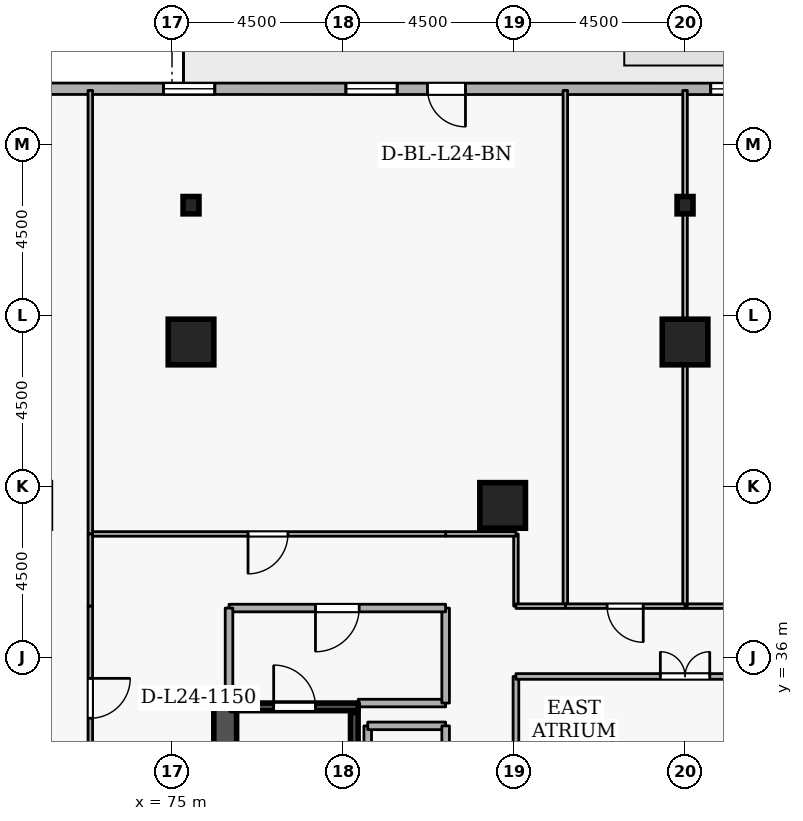
"""IFC4 building model, lengths in metres.
Left out: names, types, materials, properties, quantities, classifications, styles, units other than length and angle.
Written with IfcOpenShell. Run it as: python <this file> out.ifc"""

import sys

from ifc_helpers import new_model, si_unit, direction, frame, frame_2d, origin, origin_2d, place, context, subcontext, project, spatial, rectangle, i_section, extrude, element, fill, save


model = new_model("IFC4")
c1 = context("Model", 3, precision=1e-05, world=origin(), true_north=direction((0.0, 1.0)))
c2 = subcontext(c1, "Body", "Model", "MODEL_VIEW")
j1 = project(units=[si_unit("LENGTHUNIT", "METRE"), si_unit("PLANEANGLEUNIT", "RADIAN")], contexts=[c1])
p1 = place(None, origin())
s1 = spatial("IfcSite", under=j1, at=p1, CompositionType="ELEMENT")
p2 = place(p1, origin())
s2 = spatial("IfcBuilding", under=s1, at=p2, CompositionType="ELEMENT")
p3 = place(p2, frame((0.0, 0.0, 94.5)))
s3 = spatial("IfcBuildingStorey", under=s2, at=p3, CompositionType="ELEMENT", Elevation=94.5)
p4 = place(p3, frame((76.4, 19.2, 0.0), z_axis=(0.0, 0.0, 1.0), x_axis=(0.0, 1.0, 0.0)))
e1 = element("IfcWall", 1, at=p4, inside=s3, PredefinedType="SHEAR", context=c2, shape_type="SweptSolid", body=[
    extrude(rectangle(XDim=15.6, YDim=0.6, at=frame_2d((7.8, 0.0))), origin(), (0.0, 0.0, 1.0), 3.6),
])
for number, where, z_axis, x_axis in (
    (2, (88.5, 44.3, 0.0), (0.0, 0.0, 1.0), (1.0, 0.0, 0.0)),
    (3, (75.5, 44.3, 0.0), (0.0, 0.0, 1.0), (1.0, 0.0, 0.0)),
    (4, (83.7, 40.0, 0.0), (0.0, 0.0, 1.0), (1.0, 0.0, 0.0)),
):
    element("IfcColumn", number, at=place(p3, frame(where, z_axis=z_axis, x_axis=x_axis)), inside=s3, PredefinedType="COLUMN", context=c2, shape_type="SweptSolid", body=[
        extrude(rectangle(XDim=1.2, YDim=1.2, at=origin_2d()), origin(), (0.0, 0.0, 1.0), 3.6),
    ])
for number, where, z_axis, x_axis in (
    (5, (88.5, 47.9, 0.0), (0.0, 0.0, 1.0), (1.0, 0.0, 0.0)),
    (6, (75.5, 47.9, 0.0), (0.0, 0.0, 1.0), (1.0, 0.0, 0.0)),
):
    element("IfcColumn", number, at=place(p3, frame(where, z_axis=z_axis, x_axis=x_axis)), inside=s3, PredefinedType="COLUMN", context=c2, shape_type="SweptSolid", body=[
        extrude(i_section(OverallWidth=0.418, OverallDepth=0.456, WebThickness=0.042, FlangeThickness=0.067, FilletRadius=0.015, at=origin_2d()), origin(), (0.0, 0.0, 1.0), 3.6),
    ])
p5 = place(p3, frame((101.925, 50.958, 0.0), z_axis=(0.0, 0.0, 1.0), x_axis=(-0.999999983371, 0.000182370391, 0.0)))
e7 = element("IfcWall", 7, at=p5, inside=s3, PredefinedType="STANDARD", context=c2, shape_type="SweptSolid", body=[
    extrude(rectangle(XDim=34.806, YDim=0.3, at=frame_2d((17.403, 0.0))), origin(), (0.0, 0.0, 1.0), 2.22),
])
p6 = place(p5, frame((19.203, 0.0, 0.0)))
e8 = element("IfcOpeningElement", 8, at=p6, cuts=e7, PredefinedType="OPENING", context=c2, shape_type="SweptSolid", body=[
    extrude(rectangle(XDim=1.0, YDim=2.08, at=frame_2d((0.5, 1.04))), frame((0.0, 0.16, 0.0), z_axis=(0.0, -1.0, 0.0), x_axis=(1.0, 0.0, 0.0)), (0.0, 0.0, 1.0), 0.32),
])
p7 = place(p5, frame((1.8, 0.0, 0.72)))
e9 = element("IfcOpeningElement", 9, at=p7, cuts=e7, PredefinedType="OPENING", context=c2, shape_type="SweptSolid", body=[
    extrude(rectangle(XDim=1.35, YDim=1.05, at=frame_2d((0.675, 0.525))), frame((0.0, 0.16, 0.0), z_axis=(0.0, -1.0, 0.0), x_axis=(1.0, 0.0, 0.0)), (0.0, 0.0, 1.0), 0.32),
])
p8 = place(p5, frame((6.6, 0.0, 0.72)))
e10 = element("IfcOpeningElement", 10, at=p8, cuts=e7, PredefinedType="OPENING", context=c2, shape_type="SweptSolid", body=[
    extrude(rectangle(XDim=1.35, YDim=1.05, at=frame_2d((0.675, 0.525))), frame((0.0, 0.16, 0.0), z_axis=(0.0, -1.0, 0.0), x_axis=(1.0, 0.0, 0.0)), (0.0, 0.0, 1.0), 0.32),
])
p9 = place(p5, frame((11.4, 0.0, 0.72)))
e11 = element("IfcOpeningElement", 11, at=p9, cuts=e7, PredefinedType="OPENING", context=c2, shape_type="SweptSolid", body=[
    extrude(rectangle(XDim=1.35, YDim=1.05, at=frame_2d((0.675, 0.525))), frame((0.0, 0.16, 0.0), z_axis=(0.0, -1.0, 0.0), x_axis=(1.0, 0.0, 0.0)), (0.0, 0.0, 1.0), 0.32),
])
p10 = place(p5, frame((21.0, 0.0, 0.72)))
e12 = element("IfcOpeningElement", 12, at=p10, cuts=e7, PredefinedType="OPENING", context=c2, shape_type="SweptSolid", body=[
    extrude(rectangle(XDim=1.35, YDim=1.05, at=frame_2d((0.675, 0.525))), frame((0.0, 0.16, 0.0), z_axis=(0.0, -1.0, 0.0), x_axis=(1.0, 0.0, 0.0)), (0.0, 0.0, 1.0), 0.32),
])
p11 = place(p5, frame((25.8, 0.0, 0.72)))
e13 = element("IfcOpeningElement", 13, at=p11, cuts=e7, PredefinedType="OPENING", context=c2, shape_type="SweptSolid", body=[
    extrude(rectangle(XDim=1.35, YDim=1.05, at=frame_2d((0.675, 0.525))), frame((0.0, 0.16, 0.0), z_axis=(0.0, -1.0, 0.0), x_axis=(1.0, 0.0, 0.0)), (0.0, 0.0, 1.0), 0.32),
])
p12 = place(p5, frame((30.6, 0.0, 0.72)))
e14 = element("IfcOpeningElement", 14, at=p12, cuts=e7, PredefinedType="OPENING", context=c2, shape_type="SweptSolid", body=[
    extrude(rectangle(XDim=1.35, YDim=1.05, at=frame_2d((0.675, 0.525))), frame((0.0, 0.16, 0.0), z_axis=(0.0, -1.0, 0.0), x_axis=(1.0, 0.0, 0.0)), (0.0, 0.0, 1.0), 0.32),
])
p13 = place(p3, frame((76.55, 34.7, 0.0), z_axis=(0.0, 0.0, 1.0), x_axis=(1.0, 0.0, 0.0)))
e15 = element("IfcWall", 15, at=p13, inside=s3, PredefinedType="SHEAR", context=c2, shape_type="SweptSolid", body=[
    extrude(rectangle(XDim=3.35, YDim=0.2, at=frame_2d((1.675, 0.0))), origin(), (0.0, 0.0, 1.0), 3.6),
])
p14 = place(p13, frame((1.125, 0.0, 0.0)))
e16 = element("IfcOpeningElement", 16, at=p14, cuts=e15, PredefinedType="OPENING", context=c2, shape_type="SweptSolid", body=[
    extrude(rectangle(XDim=1.1, YDim=2.1, at=frame_2d((0.55, 1.05))), frame((0.0, 0.11, 0.0), z_axis=(0.0, -1.0, 0.0), x_axis=(1.0, 0.0, 0.0)), (0.0, 0.0, 1.0), 0.22),
])
p15 = place(p3, frame((79.797, 27.45, 0.0), z_axis=(0.0, 0.0, 1.0), x_axis=(0.0, 1.0, 0.0)))
e17 = element("IfcWall", 17, at=p15, inside=s3, PredefinedType="SHEAR", context=c2, shape_type="SweptSolid", body=[
    extrude(rectangle(XDim=7.1, YDim=0.2, at=frame_2d((3.55, 0.0))), origin(), (0.0, 0.0, 1.0), 3.6),
])
p16 = place(p3, frame((79.9, 34.8, 0.0), z_axis=(0.0, 0.0, 1.0), x_axis=(1.0, 0.0, 0.0)))
e18 = element("IfcWall", 18, at=p16, inside=s3, PredefinedType="STANDARD", context=c2, shape_type="SweptSolid", body=[
    extrude(rectangle(XDim=2.3, YDim=0.2, at=frame_2d((1.15, 0.0))), origin(), (0.0, 0.0, 1.0), 2.505),
])
p17 = place(p3, frame((82.2, 34.8, 0.0), z_axis=(0.0, 0.0, 1.0), x_axis=(0.0, 1.0, 0.0)))
e19 = element("IfcWall", 19, at=p17, inside=s3, PredefinedType="STANDARD", context=c2, shape_type="SweptSolid", body=[
    extrude(rectangle(XDim=2.5, YDim=0.2, at=frame_2d((1.25, 0.0))), origin(), (0.0, 0.0, 1.0), 3.3),
])
p18 = place(p3, frame((82.2, 37.3, 0.0), z_axis=(0.0, 0.0, 1.0), x_axis=(-1.0, 0.0, 0.0)))
e20 = element("IfcWall", 20, at=p18, inside=s3, PredefinedType="STANDARD", context=c2, shape_type="SweptSolid", body=[
    extrude(rectangle(XDim=5.7, YDim=0.2, at=frame_2d((2.85, 0.0))), origin(), (0.0, 0.0, 1.0), 3.3),
])
p19 = place(p18, frame((2.275, 0.0, 0.0)))
e21 = element("IfcOpeningElement", 21, at=p19, cuts=e20, PredefinedType="OPENING", context=c2, shape_type="SweptSolid", body=[
    extrude(rectangle(XDim=1.15, YDim=2.1, at=frame_2d((0.575, 1.05))), frame((0.0, 0.11, 0.0), z_axis=(0.0, -1.0, 0.0), x_axis=(1.0, 0.0, 0.0)), (0.0, 0.0, 1.0), 0.22),
])
p20 = place(p3, frame((76.5, 37.3, 0.0), z_axis=(0.0, 0.0, 1.0), x_axis=(0.0, -1.0, 0.0)))
e22 = element("IfcWall", 22, at=p20, inside=s3, PredefinedType="STANDARD", context=c2, shape_type="SweptSolid", body=[
    extrude(rectangle(XDim=2.5, YDim=0.2, at=frame_2d((1.25, 0.0))), origin(), (0.0, 0.0, 1.0), 3.3),
])
p21 = place(p3, frame((80.15, 31.85, 0.0), z_axis=(0.0, 0.0, 1.0), x_axis=(0.0, 1.0, 0.0)))
e23 = element("IfcWall", 23, at=p21, inside=s3, PredefinedType="STANDARD", context=c2, shape_type="SweptSolid", body=[
    extrude(rectangle(XDim=2.35, YDim=0.2, at=frame_2d((1.175, 0.0))), origin(), (0.0, 0.0, 1.0), 3.3),
])
p22 = place(p3, frame((80.15, 34.2, 0.0), z_axis=(0.0, 0.0, 1.0), x_axis=(1.0, 0.0, 0.0)))
e24 = element("IfcWall", 24, at=p22, inside=s3, PredefinedType="STANDARD", context=c2, shape_type="SweptSolid", body=[
    extrude(rectangle(XDim=2.05, YDim=0.2, at=frame_2d((1.025, 0.0))), origin(), (0.0, 0.0, 1.0), 2.505),
])
p23 = place(p3, frame((82.2, 34.2, 0.0), z_axis=(0.0, 0.0, 1.0), x_axis=(0.0, -1.0, 0.0)))
e25 = element("IfcWall", 25, at=p23, inside=s3, PredefinedType="STANDARD", context=c2, shape_type="SweptSolid", body=[
    extrude(rectangle(XDim=2.35, YDim=0.2, at=frame_2d((1.175, 0.0))), origin(), (0.0, 0.0, 1.0), 3.3),
])
p24 = place(p23, frame((0.6, 0.0, 0.0)))
e26 = element("IfcOpeningElement", 26, at=p24, cuts=e25, PredefinedType="OPENING", context=c2, shape_type="SweptSolid", body=[
    extrude(rectangle(XDim=1.15, YDim=2.1, at=frame_2d((0.575, 1.05))), frame((0.0, 0.11, 0.0), z_axis=(0.0, -1.0, 0.0), x_axis=(1.0, 0.0, 0.0)), (0.0, 0.0, 1.0), 0.22),
])
p25 = place(p3, frame((92.95, 37.35, 0.0), z_axis=(0.0, 0.0, 1.0), x_axis=(-1.0, 0.0, 0.0)))
e27 = element("IfcWall", 27, at=p25, inside=s3, PredefinedType="PARTITIONING", context=c2, shape_type="SweptSolid", body=[
    extrude(rectangle(XDim=4.45, YDim=0.12, at=frame_2d((2.225, 0.0))), origin(), (0.0, 0.0, 1.0), 3.3),
])
p26 = place(p25, frame((1.7, 0.0, 0.0)))
e28 = element("IfcOpeningElement", 28, at=p26, cuts=e27, PredefinedType="OPENING", context=c2, shape_type="SweptSolid", body=[
    extrude(rectangle(XDim=1.05, YDim=2.1, at=frame_2d((0.525, 1.05))), frame((0.0, 0.07, 0.0), z_axis=(0.0, -1.0, 0.0), x_axis=(1.0, 0.0, 0.0)), (0.0, 0.0, 1.0), 0.14),
])
p27 = place(p3, frame((88.5, 37.35, 0.0), z_axis=(0.0, 0.0, 1.0), x_axis=(0.0, 1.0, 0.0)))
e29 = element("IfcWall", 29, at=p27, inside=s3, PredefinedType="PARTITIONING", context=c2, shape_type="SweptSolid", body=[
    extrude(rectangle(XDim=13.57, YDim=0.12, at=frame_2d((6.785, 0.0))), origin(), (0.0, 0.0, 1.0), 2.892),
])
p28 = place(p3, frame((85.35, 37.35, 0.0), z_axis=(0.0, 0.0, 1.0), x_axis=(0.0, 1.0, 0.0)))
e30 = element("IfcWall", 30, at=p28, inside=s3, PredefinedType="PARTITIONING", context=c2, shape_type="SweptSolid", body=[
    extrude(rectangle(XDim=13.57, YDim=0.12, at=frame_2d((6.785, 0.0))), origin(), (0.0, 0.0, 1.0), 3.3),
])
p29 = place(p3, frame((88.5, 37.35, 0.0), z_axis=(0.0, 0.0, 1.0), x_axis=(-1.0, 0.0, 0.0)))
e31 = element("IfcWall", 31, at=p29, inside=s3, PredefinedType="PARTITIONING", context=c2, shape_type="SweptSolid", body=[
    extrude(rectangle(XDim=3.15, YDim=0.12, at=frame_2d((1.575, 0.0))), origin(), (0.0, 0.0, 1.0), 3.3),
])
p30 = place(p29, frame((1.1, 0.0, 0.0)))
e32 = element("IfcOpeningElement", 32, at=p30, cuts=e31, PredefinedType="OPENING", context=c2, shape_type="SweptSolid", body=[
    extrude(rectangle(XDim=0.95, YDim=2.1, at=frame_2d((0.475, 1.05))), frame((0.0, 0.07, 0.0), z_axis=(0.0, -1.0, 0.0), x_axis=(1.0, 0.0, 0.0)), (0.0, 0.0, 1.0), 0.14),
])
p31 = place(p3, frame((84.05, 37.35, 0.0), z_axis=(0.0, 0.0, 1.0), x_axis=(0.0, 1.0, 0.0)))
e33 = element("IfcWall", 33, at=p31, inside=s3, PredefinedType="PARTITIONING", context=c2, shape_type="SweptSolid", body=[
    extrude(rectangle(XDim=1.9, YDim=0.12, at=frame_2d((0.95, 0.0))), origin(), (0.0, 0.0, 1.0), 3.3),
])
p32 = place(p3, frame((84.05, 39.25, 0.0), z_axis=(0.0, 0.0, 1.0), x_axis=(-1.0, 0.0, 0.0)))
e34 = element("IfcWall", 34, at=p32, inside=s3, PredefinedType="PARTITIONING", context=c2, shape_type="SweptSolid", body=[
    extrude(rectangle(XDim=1.85, YDim=0.12, at=frame_2d((0.925, 0.0))), origin(), (0.0, 0.0, 1.0), 3.3),
])
p33 = place(p3, frame((82.2, 39.25, 0.0), z_axis=(0.0, 0.0, 1.0), x_axis=(-1.0, 0.0, 0.0)))
e35 = element("IfcWall", 35, at=p33, inside=s3, PredefinedType="PARTITIONING", context=c2, shape_type="SweptSolid", body=[
    extrude(rectangle(XDim=9.35, YDim=0.12, at=frame_2d((4.675, 0.0))), origin(), (0.0, 0.0, 1.0), 3.3),
])
p34 = place(p33, frame((4.15, 0.0, 0.0)))
e36 = element("IfcOpeningElement", 36, at=p34, cuts=e35, PredefinedType="OPENING", context=c2, shape_type="SweptSolid", body=[
    extrude(rectangle(XDim=1.05, YDim=2.1, at=frame_2d((0.525, 1.05))), frame((0.0, 0.07, 0.0), z_axis=(0.0, -1.0, 0.0), x_axis=(1.0, 0.0, 0.0)), (0.0, 0.0, 1.0), 0.14),
])
p35 = place(p3, frame((72.85, 39.25, 0.0), z_axis=(0.0, 0.0, 1.0), x_axis=(0.0, 1.0, 0.0)))
e37 = element("IfcWall", 37, at=p35, inside=s3, PredefinedType="PARTITIONING", context=c2, shape_type="SweptSolid", body=[
    extrude(rectangle(XDim=11.67, YDim=0.12, at=frame_2d((5.835, 0.0))), origin(), (0.0, 0.0, 1.0), 3.3),
])
p36 = place(p3, frame((85.35, 37.35, 0.0), z_axis=(0.0, 0.0, 1.0), x_axis=(-1.0, 0.0, 0.0)))
e38 = element("IfcWall", 38, at=p36, inside=s3, PredefinedType="PARTITIONING", context=c2, shape_type="SweptSolid", body=[
    extrude(rectangle(XDim=1.3, YDim=0.12, at=frame_2d((0.65, 0.0))), origin(), (0.0, 0.0, 1.0), 3.3),
])
p37 = place(p3, frame((84.05, 32.2, 0.0), z_axis=(0.0, 0.0, 1.0), x_axis=(0.0, 1.0, 0.0)))
e39 = element("IfcWall", 39, at=p37, inside=s3, PredefinedType="PARTITIONING", context=c2, shape_type="SweptSolid", body=[
    extrude(rectangle(XDim=3.3, YDim=0.15, at=frame_2d((1.65, 0.0))), origin(), (0.0, 0.0, 1.0), 3.3),
])
p38 = place(p3, frame((84.05, 35.5, 0.0), z_axis=(0.0, 0.0, 1.0), x_axis=(1.0, 0.0, 0.0)))
e40 = element("IfcWall", 40, at=p38, inside=s3, PredefinedType="PARTITIONING", context=c2, shape_type="SweptSolid", body=[
    extrude(rectangle(XDim=8.9, YDim=0.15, at=frame_2d((4.45, 0.0))), origin(), (0.0, 0.0, 1.0), 3.3),
])
p39 = place(p38, frame((3.8, 0.0, 0.0)))
e41 = element("IfcOpeningElement", 41, at=p39, cuts=e40, PredefinedType="OPENING", context=c2, shape_type="SweptSolid", body=[
    extrude(rectangle(XDim=1.3, YDim=2.12, at=frame_2d((0.65, 1.06))), frame((0.0, 0.085, 0.0), z_axis=(0.0, -1.0, 0.0), x_axis=(1.0, 0.0, 0.0)), (0.0, 0.0, 1.0), 0.17),
])
p40 = place(p3, frame((72.85, 39.25, 0.0), z_axis=(0.0, 0.0, 1.0), x_axis=(0.0, -1.0, 0.0)))
e42 = element("IfcWall", 42, at=p40, inside=s3, PredefinedType="PARTITIONING", context=c2, shape_type="SweptSolid", body=[
    extrude(rectangle(XDim=1.9, YDim=0.12, at=frame_2d((0.95, 0.0))), origin(), (0.0, 0.0, 1.0), 2.855),
])
p41 = place(p3, frame((72.85, 37.35, 0.0), z_axis=(0.0, 0.0, 1.0), x_axis=(0.0, -1.0, 0.0)))
e43 = element("IfcWall", 43, at=p41, inside=s3, PredefinedType="PARTITIONING", context=c2, shape_type="SweptSolid", body=[
    extrude(rectangle(XDim=4.85, YDim=0.12, at=frame_2d((2.425, 0.0))), origin(), (0.0, 0.0, 1.0), 2.855),
])
p42 = place(p41, frame((1.9, 0.0, 0.0)))
e44 = element("IfcOpeningElement", 44, at=p42, cuts=e43, PredefinedType="OPENING", context=c2, shape_type="SweptSolid", body=[
    extrude(rectangle(XDim=1.05, YDim=2.1, at=frame_2d((0.525, 1.05))), frame((0.0, 0.07, 0.0), z_axis=(0.0, -1.0, 0.0), x_axis=(1.0, 0.0, 0.0)), (0.0, 0.0, 1.0), 0.14),
])
p43 = place(p6, origin())
e45 = element("IfcDoor", 45, at=p43, inside=s3, OperationType="SINGLE_SWING_LEFT", PredefinedType="DOOR", context=c2, shape_type="SweptSolid", body=[
    extrude(rectangle(XDim=1.0, YDim=2.08, at=frame_2d((0.5, 1.04))), frame((0.0, 0.025, 0.0), z_axis=(0.0, -1.0, 0.0), x_axis=(1.0, 0.0, 0.0)), (0.0, 0.0, 1.0), 0.05),
])
fill(e8, e45)
p44 = place(p9, origin())
e46 = element("IfcWindow", 46, at=p44, inside=s3, PartitioningType="SINGLE_PANEL", PredefinedType="WINDOW", context=c2, shape_type="SweptSolid", body=[
    extrude(rectangle(XDim=1.35, YDim=1.05, at=frame_2d((0.675, 0.525))), frame((0.0, 0.03, 0.0), z_axis=(0.0, -1.0, 0.0), x_axis=(1.0, 0.0, 0.0)), (0.0, 0.0, 1.0), 0.06),
])
fill(e11, e46)
p45 = place(p10, origin())
e47 = element("IfcWindow", 47, at=p45, inside=s3, PartitioningType="SINGLE_PANEL", PredefinedType="WINDOW", context=c2, shape_type="SweptSolid", body=[
    extrude(rectangle(XDim=1.35, YDim=1.05, at=frame_2d((0.675, 0.525))), frame((0.0, 0.03, 0.0), z_axis=(0.0, -1.0, 0.0), x_axis=(1.0, 0.0, 0.0)), (0.0, 0.0, 1.0), 0.06),
])
fill(e12, e47)
p46 = place(p11, origin())
e48 = element("IfcWindow", 48, at=p46, inside=s3, PartitioningType="SINGLE_PANEL", PredefinedType="WINDOW", context=c2, shape_type="SweptSolid", body=[
    extrude(rectangle(XDim=1.35, YDim=1.05, at=frame_2d((0.675, 0.525))), frame((0.0, 0.03, 0.0), z_axis=(0.0, -1.0, 0.0), x_axis=(1.0, 0.0, 0.0)), (0.0, 0.0, 1.0), 0.06),
])
fill(e13, e48)
p47 = place(p14, origin())
e49 = element("IfcDoor", 49, at=p47, inside=s3, OperationType="SINGLE_SWING_LEFT", PredefinedType="DOOR", context=c2, shape_type="SweptSolid", body=[
    extrude(rectangle(XDim=1.1, YDim=2.1, at=frame_2d((0.55, 1.05))), frame((0.0, 0.025, 0.0), z_axis=(0.0, -1.0, 0.0), x_axis=(1.0, 0.0, 0.0)), (0.0, 0.0, 1.0), 0.05),
])
fill(e16, e49)
p48 = place(p19, origin())
e50 = element("IfcDoor", 50, at=p48, inside=s3, OperationType="SINGLE_SWING_RIGHT", PredefinedType="DOOR", context=c2, shape_type="SweptSolid", body=[
    extrude(rectangle(XDim=1.15, YDim=2.1, at=frame_2d((0.575, 1.05))), frame((0.0, 0.025, 0.0), z_axis=(0.0, -1.0, 0.0), x_axis=(1.0, 0.0, 0.0)), (0.0, 0.0, 1.0), 0.05),
])
fill(e21, e50)
p49 = place(p30, origin())
e51 = element("IfcDoor", 51, at=p49, inside=s3, OperationType="SINGLE_SWING_LEFT", PredefinedType="DOOR", context=c2, shape_type="SweptSolid", body=[
    extrude(rectangle(XDim=0.95, YDim=2.1, at=frame_2d((0.475, 1.05))), frame((0.0, 0.025, 0.0), z_axis=(0.0, -1.0, 0.0), x_axis=(1.0, 0.0, 0.0)), (0.0, 0.0, 1.0), 0.05),
])
fill(e32, e51)
p50 = place(p34, origin())
e52 = element("IfcDoor", 52, at=p50, inside=s3, OperationType="SINGLE_SWING_RIGHT", PredefinedType="DOOR", context=c2, shape_type="SweptSolid", body=[
    extrude(rectangle(XDim=1.05, YDim=2.1, at=frame_2d((0.525, 1.05))), frame((0.0, 0.025, 0.0), z_axis=(0.0, -1.0, 0.0), x_axis=(1.0, 0.0, 0.0)), (0.0, 0.0, 1.0), 0.05),
])
fill(e36, e52)
p51 = place(p39, origin())
e53 = element("IfcDoor", 53, at=p51, inside=s3, OperationType="DOUBLE_DOOR_SINGLE_SWING", PredefinedType="DOOR", context=c2, shape_type="SweptSolid", body=[
    extrude(rectangle(XDim=1.3, YDim=2.12, at=frame_2d((0.65, 1.06))), frame((0.0, 0.025, 0.0), z_axis=(0.0, -1.0, 0.0), x_axis=(1.0, 0.0, 0.0)), (0.0, 0.0, 1.0), 0.05),
])
fill(e41, e53)
p52 = place(p42, origin())
e54 = element("IfcDoor", 54, at=p52, inside=s3, OperationType="SINGLE_SWING_LEFT", PredefinedType="DOOR", context=c2, shape_type="SweptSolid", body=[
    extrude(rectangle(XDim=1.05, YDim=2.1, at=frame_2d((0.525, 1.05))), frame((0.0, 0.025, 0.0), z_axis=(0.0, -1.0, 0.0), x_axis=(1.0, 0.0, 0.0)), (0.0, 0.0, 1.0), 0.05),
])
fill(e44, e54)
save(model, sys.argv[1])
